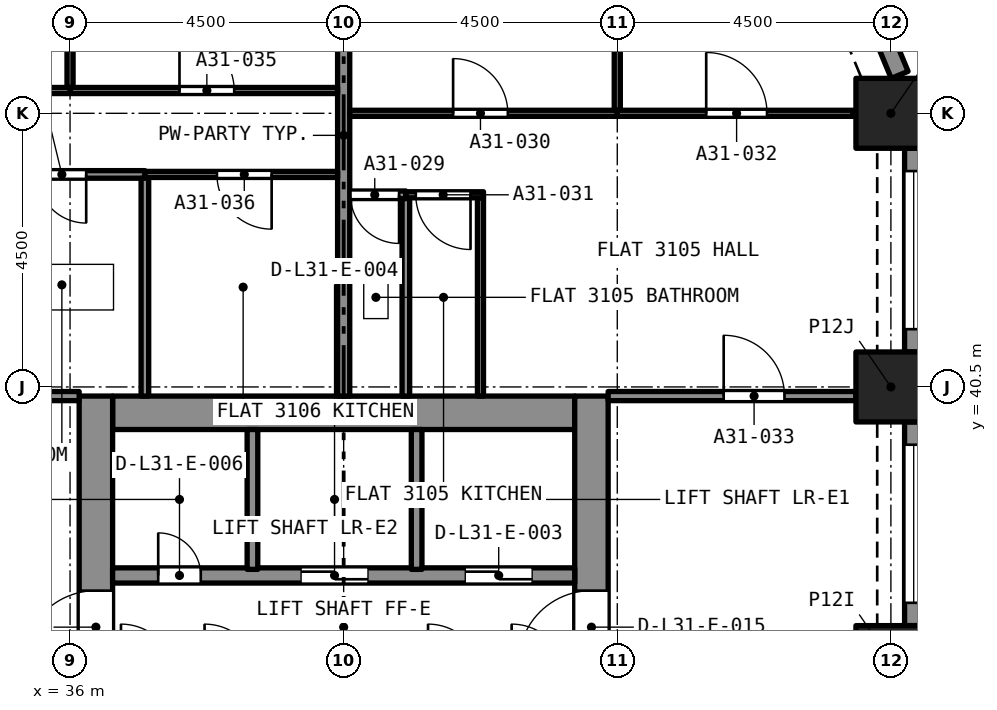
"""IFC4 building model, lengths in metres.
Left out: names, types, materials, properties, quantities, classifications, styles, units other than length and angle.
Written with IfcOpenShell. Run it as: python <this file> out.ifc"""

import sys

from ifc_helpers import new_model, si_unit, direction, frame, frame_2d, origin, origin_2d, place, context, subcontext, project, spatial, rectangle, extrude, element, fill, save


model = new_model("IFC4")
c1 = context("Model", 3, precision=1e-05, world=origin(), true_north=direction((0.0, 1.0)))
c2 = subcontext(c1, "Body", "Model", "MODEL_VIEW")
j1 = project(units=[si_unit("LENGTHUNIT", "METRE"), si_unit("PLANEANGLEUNIT", "RADIAN")], contexts=[c1])
p1 = place(None, origin())
s1 = spatial("IfcSite", under=j1, at=p1, CompositionType="ELEMENT")
p2 = place(p1, origin())
s2 = spatial("IfcBuilding", under=s1, at=p2, CompositionType="ELEMENT")
p3 = place(p2, frame((0.0, 0.0, 112.0)))
s3 = spatial("IfcBuildingStorey", under=s2, at=p3, CompositionType="ELEMENT", Elevation=112.0)
for number, where, z_axis, x_axis in (
    (1, (49.5, 36.0, 0.0), (0.0, 0.0, 1.0), (1.0, 0.0, 0.0)),
    (2, (49.5, 40.5, 0.0), (0.0, 0.0, 1.0), (1.0, 0.0, 0.0)),
    (3, (49.5, 45.0, 0.0), (0.0, 0.0, 1.0), (1.0, 0.0, 0.0)),
):
    element("IfcColumn", number, at=place(p3, frame(where, z_axis=z_axis, x_axis=x_axis)), inside=s3, PredefinedType="COLUMN", context=c2, shape_type="SweptSolid", body=[
        extrude(rectangle(XDim=1.15, YDim=1.15, at=origin_2d()), origin(), (0.0, 0.0, 1.0), 3.2),
    ])
p4 = place(p3, frame((36.7, 40.075, 0.0), z_axis=(0.0, 0.0, 1.0), x_axis=(1.0, 0.0, 0.0)))
e4 = element("IfcWall", 4, at=p4, inside=s3, PredefinedType="SOLIDWALL", context=c2, shape_type="SweptSolid", body=[
    extrude(rectangle(XDim=7.6, YDim=0.55, at=frame_2d((3.8, 0.0))), origin(), (0.0, 0.0, 1.0), 3.2),
])
p5 = place(p3, frame((36.425, 27.15, 0.0), z_axis=(0.0, 0.0, 1.0), x_axis=(0.0, 1.0, 0.0)))
e5 = element("IfcWall", 5, at=p5, inside=s3, PredefinedType="SOLIDWALL", context=c2, shape_type="SweptSolid", body=[
    extrude(rectangle(XDim=13.2, YDim=0.55, at=frame_2d((6.6, 0.0))), origin(), (0.0, 0.0, 1.0), 3.2),
])
p6 = place(p5, frame((8.8, 0.0, 0.0)))
e6 = element("IfcOpeningElement", 6, at=p6, cuts=e5, PredefinedType="OPENING", context=c2, shape_type="SweptSolid", body=[
    extrude(rectangle(XDim=1.2, YDim=2.1, at=frame_2d((0.6, 1.05))), frame((0.0, 0.285, 0.0), z_axis=(0.0, -1.0, 0.0), x_axis=(1.0, 0.0, 0.0)), (0.0, 0.0, 1.0), 0.57),
])
p7 = place(p3, frame((44.575, 27.15, 0.0), z_axis=(0.0, 0.0, 1.0), x_axis=(0.0, 1.0, 0.0)))
e7 = element("IfcWall", 7, at=p7, inside=s3, PredefinedType="SOLIDWALL", context=c2, shape_type="SweptSolid", body=[
    extrude(rectangle(XDim=13.2, YDim=0.55, at=frame_2d((6.6, 0.0))), origin(), (0.0, 0.0, 1.0), 3.2),
])
p8 = place(p7, frame((8.8, 0.0, 0.0)))
e8 = element("IfcOpeningElement", 8, at=p8, cuts=e7, PredefinedType="OPENING", context=c2, shape_type="SweptSolid", body=[
    extrude(rectangle(XDim=1.2, YDim=2.1, at=frame_2d((0.6, 1.05))), frame((0.0, 0.285, 0.0), z_axis=(0.0, -1.0, 0.0), x_axis=(1.0, 0.0, 0.0)), (0.0, 0.0, 1.0), 0.57),
])
p9 = place(p3, frame((49.875, 39.925, 0.0), z_axis=(0.0, 0.0, 1.0), x_axis=(0.0, -1.0, 0.0)))
e9 = element("IfcWall", 9, at=p9, inside=s3, PredefinedType="SOLIDWALL", context=c2, shape_type="SweptSolid", body=[
    extrude(rectangle(XDim=3.35, YDim=0.3, at=frame_2d((1.675, 0.0))), origin(), (0.0, 0.0, 1.0), 3.2),
])
p10 = place(p9, frame((0.375, 0.0, 0.45)))
e10 = element("IfcOpeningElement", 10, at=p10, cuts=e9, PredefinedType="OPENING", context=c2, shape_type="SweptSolid", body=[
    extrude(rectangle(XDim=2.6, YDim=1.95, at=frame_2d((1.3, 0.975))), frame((0.0, 0.16, 0.0), z_axis=(0.0, -1.0, 0.0), x_axis=(1.0, 0.0, 0.0)), (0.0, 0.0, 1.0), 0.32),
])
p11 = place(p3, frame((49.875, 44.425, 0.0), z_axis=(0.0, 0.0, 1.0), x_axis=(0.0, -1.0, 0.0)))
e11 = element("IfcWall", 11, at=p11, inside=s3, PredefinedType="SOLIDWALL", context=c2, shape_type="SweptSolid", body=[
    extrude(rectangle(XDim=3.35, YDim=0.3, at=frame_2d((1.675, 0.0))), origin(), (0.0, 0.0, 1.0), 3.2),
])
p12 = place(p11, frame((0.375, 0.0, 0.45)))
e12 = element("IfcOpeningElement", 12, at=p12, cuts=e11, PredefinedType="OPENING", context=c2, shape_type="SweptSolid", body=[
    extrude(rectangle(XDim=2.6, YDim=1.95, at=frame_2d((1.3, 0.975))), frame((0.0, 0.16, 0.0), z_axis=(0.0, -1.0, 0.0), x_axis=(1.0, 0.0, 0.0)), (0.0, 0.0, 1.0), 0.32),
])
p13 = place(p3, frame((48.816, 47.631, 0.0), z_axis=(0.0, 0.0, 1.0), x_axis=(0.382723818695, -0.923862802911, 0.0)))
e13 = element("IfcWall", 13, at=p13, inside=s3, PredefinedType="SOLIDWALL", context=c2, shape_type="SweptSolid", body=[
    extrude(rectangle(XDim=2.164, YDim=0.3, at=frame_2d((1.082, 0.0))), origin(), (0.0, 0.0, 1.0), 3.2),
])
p14 = place(p13, frame((0.271, 0.0, 0.45)))
e14 = element("IfcOpeningElement", 14, at=p14, cuts=e13, PredefinedType="OPENING", context=c2, shape_type="SweptSolid", body=[
    extrude(rectangle(XDim=1.4, YDim=1.95, at=frame_2d((0.7, 0.975))), frame((0.0, 0.16, 0.0), z_axis=(0.0, -1.0, 0.0), x_axis=(1.0, 0.0, 0.0)), (0.0, 0.0, 1.0), 0.32),
])
p15 = place(p3, frame((41.523, 43.66, 0.0), z_axis=(0.0, 0.0, 1.0), x_axis=(-1.0, 0.0, 0.0)))
e15 = element("IfcWall", 15, at=p15, inside=s3, PredefinedType="PARTITIONING", context=c2, shape_type="SweptSolid", body=[
    extrude(rectangle(XDim=0.923, YDim=0.125, at=frame_2d((0.461, 0.0))), origin(), (0.0, 0.0, 1.0), 2.9),
])
p16 = place(p15, frame((0.111, 0.0, 0.0)))
e16 = element("IfcOpeningElement", 16, at=p16, cuts=e15, PredefinedType="OPENING", context=c2, shape_type="SweptSolid", body=[
    extrude(rectangle(XDim=0.8, YDim=2.1, at=frame_2d((0.4, 1.05))), frame((0.0, 0.073, 0.0), z_axis=(0.0, -1.0, 0.0), x_axis=(1.0, 0.0, 0.0)), (0.0, 0.0, 1.0), 0.145),
])
p17 = place(p3, frame((41.523, 40.35, 0.0), z_axis=(0.0, 0.0, 1.0), x_axis=(0.0, 1.0, 0.0)))
e17 = element("IfcWall", 17, at=p17, inside=s3, PredefinedType="PARTITIONING", context=c2, shape_type="SweptSolid", body=[
    extrude(rectangle(XDim=3.247, YDim=0.125, at=frame_2d((1.624, 0.0))), origin(), (0.0, 0.0, 1.0), 2.9),
])
p18 = place(p3, frame((40.5, 40.35, 0.0), z_axis=(0.0, 0.0, 1.0), x_axis=(0.0, 1.0, 0.0)))
e18 = element("IfcWall", 18, at=p18, inside=s3, PredefinedType="PARTITIONING", context=c2, shape_type="SweptSolid", body=[
    extrude(rectangle(XDim=8.575, YDim=0.2, at=frame_2d((4.288, 0.0))), origin(), (0.0, 0.0, 1.0), 2.9),
])
p19 = place(p3, frame((40.6, 45.0, 0.0), z_axis=(0.0, 0.0, 1.0), x_axis=(1.0, 0.0, 0.0)))
e19 = element("IfcWall", 19, at=p19, inside=s3, PredefinedType="PARTITIONING", context=c2, shape_type="SweptSolid", body=[
    extrude(rectangle(XDim=4.4, YDim=0.1, at=frame_2d((2.2, 0.0))), origin(), (0.0, 0.0, 1.0), 2.9),
])
p20 = place(p19, frame((1.7, 0.0, 0.0)))
e20 = element("IfcOpeningElement", 20, at=p20, cuts=e19, PredefinedType="OPENING", context=c2, shape_type="SweptSolid", body=[
    extrude(rectangle(XDim=0.9, YDim=2.1, at=frame_2d((0.45, 1.05))), frame((0.0, 0.06, 0.0), z_axis=(0.0, -1.0, 0.0), x_axis=(1.0, 0.0, 0.0)), (0.0, 0.0, 1.0), 0.12),
])
p21 = place(p3, frame((45.0, 45.05, 0.0), z_axis=(0.0, 0.0, 1.0), x_axis=(0.0, 1.0, 0.0)))
e21 = element("IfcWall", 21, at=p21, inside=s3, PredefinedType="PARTITIONING", context=c2, shape_type="SweptSolid", body=[
    extrude(rectangle(XDim=3.828, YDim=0.1, at=frame_2d((1.914, 0.0))), origin(), (0.0, 0.0, 1.0), 2.9),
])
p22 = place(p3, frame((42.75, 40.35, 0.0), z_axis=(0.0, 0.0, 1.0), x_axis=(0.0, 1.0, 0.0)))
e22 = element("IfcWall", 22, at=p22, inside=s3, PredefinedType="PARTITIONING", context=c2, shape_type="SweptSolid", body=[
    extrude(rectangle(XDim=3.26, YDim=0.1, at=frame_2d((1.63, 0.0))), origin(), (0.0, 0.0, 1.0), 2.9),
])
p23 = place(p3, frame((42.8, 43.66, 0.0), z_axis=(0.0, 0.0, 1.0), x_axis=(-1.0, 0.0, 0.0)))
e23 = element("IfcWall", 23, at=p23, inside=s3, PredefinedType="PARTITIONING", context=c2, shape_type="SweptSolid", body=[
    extrude(rectangle(XDim=1.277, YDim=0.1, at=frame_2d((0.639, 0.0))), origin(), (0.0, 0.0, 1.0), 2.9),
])
p24 = place(p23, frame((0.214, 0.0, 0.0)))
e24 = element("IfcOpeningElement", 24, at=p24, cuts=e23, PredefinedType="OPENING", context=c2, shape_type="SweptSolid", body=[
    extrude(rectangle(XDim=0.9, YDim=2.1, at=frame_2d((0.45, 1.05))), frame((0.0, 0.06, 0.0), z_axis=(0.0, -1.0, 0.0), x_axis=(1.0, 0.0, 0.0)), (0.0, 0.0, 1.0), 0.12),
])
p25 = place(p3, frame((45.0, 45.0, 0.0), z_axis=(0.0, 0.0, 1.0), x_axis=(1.0, 0.0, 0.0)))
e25 = element("IfcWall", 25, at=p25, inside=s3, PredefinedType="PARTITIONING", context=c2, shape_type="SweptSolid", body=[
    extrude(rectangle(XDim=3.878, YDim=0.1, at=frame_2d((1.939, 0.0))), origin(), (0.0, 0.0, 1.0), 2.9),
])
p26 = place(p25, frame((1.462, 0.0, 0.0)))
e26 = element("IfcOpeningElement", 26, at=p26, cuts=e25, PredefinedType="OPENING", context=c2, shape_type="SweptSolid", body=[
    extrude(rectangle(XDim=1.0, YDim=2.1, at=frame_2d((0.5, 1.05))), frame((0.0, 0.06, 0.0), z_axis=(0.0, -1.0, 0.0), x_axis=(1.0, 0.0, 0.0)), (0.0, 0.0, 1.0), 0.12),
])
p27 = place(p3, frame((44.85, 40.35, 0.0), z_axis=(0.0, 0.0, 1.0), x_axis=(1.0, 0.0, 0.0)))
e27 = element("IfcWall", 27, at=p27, inside=s3, PredefinedType="PARTITIONING", context=c2, shape_type="SweptSolid", body=[
    extrude(rectangle(XDim=4.075, YDim=0.15, at=frame_2d((2.038, 0.0))), origin(), (0.0, 0.0, 1.0), 2.9),
])
p28 = place(p27, frame((1.9, 0.0, 0.0)))
e28 = element("IfcOpeningElement", 28, at=p28, cuts=e27, PredefinedType="OPENING", context=c2, shape_type="SweptSolid", body=[
    extrude(rectangle(XDim=1.0, YDim=2.1, at=frame_2d((0.5, 1.05))), frame((0.0, 0.085, 0.0), z_axis=(0.0, -1.0, 0.0), x_axis=(1.0, 0.0, 0.0)), (0.0, 0.0, 1.0), 0.17),
])
p29 = place(p3, frame((37.231, 43.995, 0.0), z_axis=(0.0, 0.0, 1.0), x_axis=(-1.0, 0.0, 0.0)))
e29 = element("IfcWall", 29, at=p29, inside=s3, PredefinedType="PARTITIONING", context=c2, shape_type="SweptSolid", body=[
    extrude(rectangle(XDim=2.794, YDim=0.125, at=frame_2d((1.397, 0.0))), origin(), (0.0, 0.0, 1.0), 2.9),
])
p30 = place(p29, frame((0.966, 0.0, 0.0)))
e30 = element("IfcOpeningElement", 30, at=p30, cuts=e29, PredefinedType="OPENING", context=c2, shape_type="SweptSolid", body=[
    extrude(rectangle(XDim=0.8, YDim=2.1, at=frame_2d((0.4, 1.05))), frame((0.0, 0.073, 0.0), z_axis=(0.0, -1.0, 0.0), x_axis=(1.0, 0.0, 0.0)), (0.0, 0.0, 1.0), 0.145),
])
p31 = place(p3, frame((37.231, 40.35, 0.0), z_axis=(0.0, 0.0, 1.0), x_axis=(0.0, 1.0, 0.0)))
e31 = element("IfcWall", 31, at=p31, inside=s3, PredefinedType="PARTITIONING", context=c2, shape_type="SweptSolid", body=[
    extrude(rectangle(XDim=3.583, YDim=0.125, at=frame_2d((1.791, 0.0))), origin(), (0.0, 0.0, 1.0), 2.9),
])
p32 = place(p3, frame((34.5, 40.35, 0.0), z_axis=(0.0, 0.0, 1.0), x_axis=(1.0, 0.0, 0.0)))
e32 = element("IfcWall", 32, at=p32, inside=s3, PredefinedType="PARTITIONING", context=c2, shape_type="SweptSolid", body=[
    extrude(rectangle(XDim=1.65, YDim=0.15, at=frame_2d((0.825, 0.0))), origin(), (0.0, 0.0, 1.0), 2.9),
])
p33 = place(p3, frame((36.0, 45.375, 0.0), z_axis=(0.0, 0.0, 1.0), x_axis=(1.0, 0.0, 0.0)))
e33 = element("IfcWall", 33, at=p33, inside=s3, PredefinedType="PARTITIONING", context=c2, shape_type="SweptSolid", body=[
    extrude(rectangle(XDim=4.4, YDim=0.1, at=frame_2d((2.2, 0.0))), origin(), (0.0, 0.0, 1.0), 2.9),
])
p34 = place(p33, frame((1.8, 0.0, 0.0)))
e34 = element("IfcOpeningElement", 34, at=p34, cuts=e33, PredefinedType="OPENING", context=c2, shape_type="SweptSolid", body=[
    extrude(rectangle(XDim=0.9, YDim=2.1, at=frame_2d((0.45, 1.05))), frame((0.0, 0.06, 0.0), z_axis=(0.0, -1.0, 0.0), x_axis=(1.0, 0.0, 0.0)), (0.0, 0.0, 1.0), 0.12),
])
p35 = place(p3, frame((36.0, 45.425, 0.0), z_axis=(0.0, 0.0, 1.0), x_axis=(0.0, 1.0, 0.0)))
e35 = element("IfcWall", 35, at=p35, inside=s3, PredefinedType="PARTITIONING", context=c2, shape_type="SweptSolid", body=[
    extrude(rectangle(XDim=3.5, YDim=0.1, at=frame_2d((1.75, 0.0))), origin(), (0.0, 0.0, 1.0), 2.9),
])
p36 = place(p3, frame((40.4, 43.995, 0.0), z_axis=(0.0, 0.0, 1.0), x_axis=(-1.0, 0.0, 0.0)))
e36 = element("IfcWall", 36, at=p36, inside=s3, PredefinedType="PARTITIONING", context=c2, shape_type="SweptSolid", body=[
    extrude(rectangle(XDim=3.168, YDim=0.1, at=frame_2d((1.584, 0.0))), origin(), (0.0, 0.0, 1.0), 2.9),
])
p37 = place(p36, frame((1.084, 0.0, 0.0)))
e37 = element("IfcOpeningElement", 37, at=p37, cuts=e36, PredefinedType="OPENING", context=c2, shape_type="SweptSolid", body=[
    extrude(rectangle(XDim=0.9, YDim=2.1, at=frame_2d((0.45, 1.05))), frame((0.0, 0.06, 0.0), z_axis=(0.0, -1.0, 0.0), x_axis=(1.0, 0.0, 0.0)), (0.0, 0.0, 1.0), 0.12),
])
p38 = place(p3, frame((32.075, 45.375, 0.0), z_axis=(0.0, 0.0, 1.0), x_axis=(1.0, 0.0, 0.0)))
e38 = element("IfcWall", 38, at=p38, inside=s3, PredefinedType="PARTITIONING", context=c2, shape_type="SweptSolid", body=[
    extrude(rectangle(XDim=3.925, YDim=0.1, at=frame_2d((1.962, 0.0))), origin(), (0.0, 0.0, 1.0), 2.9),
])
p39 = place(p38, frame((1.175, 0.0, 0.0)))
e39 = element("IfcOpeningElement", 39, at=p39, cuts=e38, PredefinedType="OPENING", context=c2, shape_type="SweptSolid", body=[
    extrude(rectangle(XDim=1.0, YDim=2.1, at=frame_2d((0.5, 1.05))), frame((0.0, 0.06, 0.0), z_axis=(0.0, -1.0, 0.0), x_axis=(1.0, 0.0, 0.0)), (0.0, 0.0, 1.0), 0.12),
])
p40 = place(p3, frame((36.7, 37.4, 0.0), z_axis=(0.0, 0.0, 1.0), x_axis=(1.0, 0.0, 0.0)))
e40 = element("IfcWall", 40, at=p40, inside=s3, PredefinedType="SOLIDWALL", context=c2, shape_type="SweptSolid", body=[
    extrude(rectangle(XDim=7.6, YDim=0.25, at=frame_2d((3.8, 0.0))), origin(), (0.0, 0.0, 1.0), 2.9),
])
p41 = place(p40, frame((5.8, 0.0, 0.0)))
e41 = element("IfcOpeningElement", 41, at=p41, cuts=e40, PredefinedType="OPENING", context=c2, shape_type="SweptSolid", body=[
    extrude(rectangle(XDim=1.1, YDim=2.4, at=frame_2d((0.55, 1.2))), frame((0.0, 0.135, 0.0), z_axis=(0.0, -1.0, 0.0), x_axis=(1.0, 0.0, 0.0)), (0.0, 0.0, 1.0), 0.27),
])
p42 = place(p40, frame((3.1, 0.0, 0.0)))
e42 = element("IfcOpeningElement", 42, at=p42, cuts=e40, PredefinedType="OPENING", context=c2, shape_type="SweptSolid", body=[
    extrude(rectangle(XDim=1.1, YDim=2.4, at=frame_2d((0.55, 1.2))), frame((0.0, 0.135, 0.0), z_axis=(0.0, -1.0, 0.0), x_axis=(1.0, 0.0, 0.0)), (0.0, 0.0, 1.0), 0.27),
])
p43 = place(p40, frame((0.75, 0.0, 0.0)))
e43 = element("IfcOpeningElement", 43, at=p43, cuts=e40, PredefinedType="OPENING", context=c2, shape_type="SweptSolid", body=[
    extrude(rectangle(XDim=0.7, YDim=2.1, at=frame_2d((0.35, 1.05))), frame((0.0, 0.135, 0.0), z_axis=(0.0, -1.0, 0.0), x_axis=(1.0, 0.0, 0.0)), (0.0, 0.0, 1.0), 0.27),
])
for number, where, z_axis, x_axis in (
    (44, (41.7, 37.5, 0.0), (0.0, 0.0, 1.0), (0.0, 1.0, 0.0)),
    (45, (39.0, 37.5, 0.0), (0.0, 0.0, 1.0), (0.0, 1.0, 0.0)),
):
    element("IfcWall", number, at=place(p3, frame(where, z_axis=z_axis, x_axis=x_axis)), inside=s3, PredefinedType="SOLIDWALL", context=c2, shape_type="SweptSolid", body=[
        extrude(rectangle(XDim=2.3, YDim=0.175, at=frame_2d((1.15, 0.0))), origin(), (0.0, 0.0, 1.0), 2.9),
    ])
p44 = place(p10, origin())
e46 = element("IfcWindow", 46, at=p44, inside=s3, PartitioningType="SINGLE_PANEL", PredefinedType="WINDOW", context=c2, shape_type="SweptSolid", body=[
    extrude(rectangle(XDim=2.6, YDim=1.95, at=frame_2d((1.3, 0.975))), frame((0.0, 0.03, 0.0), z_axis=(0.0, -1.0, 0.0), x_axis=(1.0, 0.0, 0.0)), (0.0, 0.0, 1.0), 0.06),
])
fill(e10, e46)
p45 = place(p12, origin())
e47 = element("IfcWindow", 47, at=p45, inside=s3, PartitioningType="SINGLE_PANEL", PredefinedType="WINDOW", context=c2, shape_type="SweptSolid", body=[
    extrude(rectangle(XDim=2.6, YDim=1.95, at=frame_2d((1.3, 0.975))), frame((0.0, 0.03, 0.0), z_axis=(0.0, -1.0, 0.0), x_axis=(1.0, 0.0, 0.0)), (0.0, 0.0, 1.0), 0.06),
])
fill(e12, e47)
p46 = place(p16, origin())
e48 = element("IfcDoor", 48, at=p46, inside=s3, OperationType="SINGLE_SWING_RIGHT", PredefinedType="DOOR", context=c2, shape_type="SweptSolid", body=[
    extrude(rectangle(XDim=0.8, YDim=2.1, at=frame_2d((0.4, 1.05))), frame((0.0, 0.025, 0.0), z_axis=(0.0, -1.0, 0.0), x_axis=(1.0, 0.0, 0.0)), (0.0, 0.0, 1.0), 0.05),
])
fill(e16, e48)
p47 = place(p20, origin())
e49 = element("IfcDoor", 49, at=p47, inside=s3, OperationType="SINGLE_SWING_LEFT", PredefinedType="DOOR", context=c2, shape_type="SweptSolid", body=[
    extrude(rectangle(XDim=0.9, YDim=2.1, at=frame_2d((0.45, 1.05))), frame((0.0, 0.025, 0.0), z_axis=(0.0, -1.0, 0.0), x_axis=(1.0, 0.0, 0.0)), (0.0, 0.0, 1.0), 0.05),
])
fill(e20, e49)
p48 = place(p24, origin())
e50 = element("IfcDoor", 50, at=p48, inside=s3, OperationType="SINGLE_SWING_RIGHT", PredefinedType="DOOR", context=c2, shape_type="SweptSolid", body=[
    extrude(rectangle(XDim=0.9, YDim=2.1, at=frame_2d((0.45, 1.05))), frame((0.0, 0.025, 0.0), z_axis=(0.0, -1.0, 0.0), x_axis=(1.0, 0.0, 0.0)), (0.0, 0.0, 1.0), 0.05),
])
fill(e24, e50)
p49 = place(p26, origin())
e51 = element("IfcDoor", 51, at=p49, inside=s3, OperationType="SINGLE_SWING_RIGHT", PredefinedType="DOOR", context=c2, shape_type="SweptSolid", body=[
    extrude(rectangle(XDim=1.0, YDim=2.1, at=frame_2d((0.5, 1.05))), frame((0.0, 0.025, 0.0), z_axis=(0.0, -1.0, 0.0), x_axis=(1.0, 0.0, 0.0)), (0.0, 0.0, 1.0), 0.05),
])
fill(e26, e51)
p50 = place(p28, origin())
e52 = element("IfcDoor", 52, at=p50, inside=s3, OperationType="SINGLE_SWING_RIGHT", PredefinedType="DOOR", context=c2, shape_type="SweptSolid", body=[
    extrude(rectangle(XDim=1.0, YDim=2.1, at=frame_2d((0.5, 1.05))), frame((0.0, 0.025, 0.0), z_axis=(0.0, -1.0, 0.0), x_axis=(1.0, 0.0, 0.0)), (0.0, 0.0, 1.0), 0.05),
])
fill(e28, e52)
p51 = place(p30, origin())
e53 = element("IfcDoor", 53, at=p51, inside=s3, OperationType="SINGLE_SWING_LEFT", PredefinedType="DOOR", context=c2, shape_type="SweptSolid", body=[
    extrude(rectangle(XDim=0.8, YDim=2.1, at=frame_2d((0.4, 1.05))), frame((0.0, 0.025, 0.0), z_axis=(0.0, -1.0, 0.0), x_axis=(1.0, 0.0, 0.0)), (0.0, 0.0, 1.0), 0.05),
])
fill(e30, e53)
p52 = place(p34, origin())
e54 = element("IfcDoor", 54, at=p52, inside=s3, OperationType="SINGLE_SWING_RIGHT", PredefinedType="DOOR", context=c2, shape_type="SweptSolid", body=[
    extrude(rectangle(XDim=0.9, YDim=2.1, at=frame_2d((0.45, 1.05))), frame((0.0, 0.025, 0.0), z_axis=(0.0, -1.0, 0.0), x_axis=(1.0, 0.0, 0.0)), (0.0, 0.0, 1.0), 0.05),
])
fill(e34, e54)
p53 = place(p37, origin())
e55 = element("IfcDoor", 55, at=p53, inside=s3, OperationType="SINGLE_SWING_LEFT", PredefinedType="DOOR", context=c2, shape_type="SweptSolid", body=[
    extrude(rectangle(XDim=0.9, YDim=2.1, at=frame_2d((0.45, 1.05))), frame((0.0, 0.025, 0.0), z_axis=(0.0, -1.0, 0.0), x_axis=(1.0, 0.0, 0.0)), (0.0, 0.0, 1.0), 0.05),
])
fill(e37, e55)
p54 = place(p41, origin())
e56 = element("IfcDoor", 56, at=p54, inside=s3, OperationType="SLIDING_TO_LEFT", PredefinedType="DOOR", context=c2, shape_type="SweptSolid", body=[
    extrude(rectangle(XDim=1.1, YDim=2.4, at=frame_2d((0.55, 1.2))), frame((0.0, 0.025, 0.0), z_axis=(0.0, -1.0, 0.0), x_axis=(1.0, 0.0, 0.0)), (0.0, 0.0, 1.0), 0.05),
])
fill(e41, e56)
p55 = place(p42, origin())
e57 = element("IfcDoor", 57, at=p55, inside=s3, OperationType="SLIDING_TO_LEFT", PredefinedType="DOOR", context=c2, shape_type="SweptSolid", body=[
    extrude(rectangle(XDim=1.1, YDim=2.4, at=frame_2d((0.55, 1.2))), frame((0.0, 0.025, 0.0), z_axis=(0.0, -1.0, 0.0), x_axis=(1.0, 0.0, 0.0)), (0.0, 0.0, 1.0), 0.05),
])
fill(e42, e57)
p56 = place(p43, origin())
e58 = element("IfcDoor", 58, at=p56, inside=s3, OperationType="SINGLE_SWING_LEFT", PredefinedType="DOOR", context=c2, shape_type="SweptSolid", body=[
    extrude(rectangle(XDim=0.7, YDim=2.1, at=frame_2d((0.35, 1.05))), frame((0.0, 0.025, 0.0), z_axis=(0.0, -1.0, 0.0), x_axis=(1.0, 0.0, 0.0)), (0.0, 0.0, 1.0), 0.05),
])
fill(e43, e58)
p57 = place(p6, origin())
e59 = element("IfcDoor", 59, at=p57, inside=s3, OperationType="SINGLE_SWING_LEFT", PredefinedType="DOOR", context=c2, shape_type="SweptSolid", body=[
    extrude(rectangle(XDim=1.2, YDim=2.1, at=frame_2d((0.6, 1.05))), frame((0.0, 0.025, 0.0), z_axis=(0.0, -1.0, 0.0), x_axis=(1.0, 0.0, 0.0)), (0.0, 0.0, 1.0), 0.05),
])
fill(e6, e59)
p58 = place(p8, origin())
e60 = element("IfcDoor", 60, at=p58, inside=s3, OperationType="SINGLE_SWING_LEFT", PredefinedType="DOOR", context=c2, shape_type="SweptSolid", body=[
    extrude(rectangle(XDim=1.2, YDim=2.1, at=frame_2d((0.6, 1.05))), frame((0.0, 0.025, 0.0), z_axis=(0.0, -1.0, 0.0), x_axis=(1.0, 0.0, 0.0)), (0.0, 0.0, 1.0), 0.05),
])
fill(e8, e60)
save(model, sys.argv[1])
